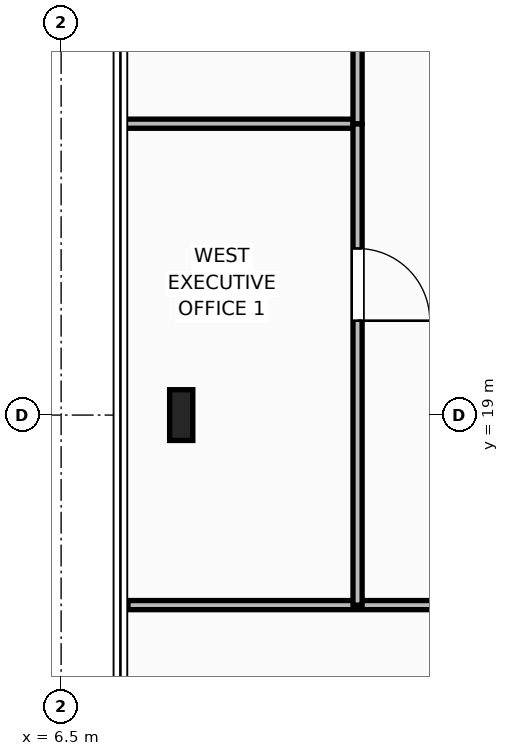
"""IFC4 building model, lengths in metres.
Left out: names, types, materials, properties, quantities, classifications, styles, units other than length and angle.
Written with IfcOpenShell. Run it as: python <this file> out.ifc"""

import sys

from ifc_helpers import new_model, si_unit, direction, frame, frame_2d, origin, origin_2d, place, context, subcontext, project, spatial, rectangle, i_section, extrude, element, fill, save


model = new_model("IFC4")
c1 = context("Model", 3, precision=1e-05, world=origin(), true_north=direction((0.0, 1.0)))
c2 = subcontext(c1, "Body", "Model", "MODEL_VIEW")
j1 = project(units=[si_unit("LENGTHUNIT", "METRE"), si_unit("PLANEANGLEUNIT", "RADIAN")], contexts=[c1])
p1 = place(None, origin())
s1 = spatial("IfcSite", under=j1, at=p1, CompositionType="ELEMENT")
p2 = place(p1, origin())
s2 = spatial("IfcBuilding", under=s1, at=p2, CompositionType="ELEMENT")
p3 = place(p2, frame((0.0, 0.0, 259.4)))
s3 = spatial("IfcBuildingStorey", under=s2, at=p3, CompositionType="ELEMENT", Elevation=259.4)
p4 = place(p3, frame((8.08, 19.0, 0.0), z_axis=(0.0, 0.0, 1.0), x_axis=(1.0, 0.0, 0.0)))
e1 = element("IfcColumn", 1, at=p4, inside=s3, PredefinedType="COLUMN", context=c2, shape_type="SweptSolid", body=[
    extrude(i_section(OverallWidth=0.305, OverallDepth=0.668, WebThickness=0.021, FlangeThickness=0.04, at=origin_2d()), origin(), (0.0, 0.0, 1.0), 3.8),
])
p5 = place(p3, frame((7.38, 16.5, 0.0), z_axis=(0.0, 0.0, 1.0), x_axis=(1.0, 0.0, 0.0)))
e2 = element("IfcWall", 2, at=p5, inside=s3, PredefinedType="PARTITIONING", context=c2, shape_type="SweptSolid", body=[
    extrude(rectangle(XDim=13.167, YDim=0.12, at=frame_2d((6.583, 0.0))), origin(), (0.0, 0.0, 1.0), 3.588),
])
p6 = place(p5, frame((7.619, 0.0, 0.0)))
e3 = element("IfcOpeningElement", 3, at=p6, cuts=e2, PredefinedType="OPENING", context=c2, shape_type="SweptSolid", body=[
    extrude(rectangle(XDim=0.95, YDim=2.15, at=frame_2d((0.475, 1.075))), frame((0.0, 0.07, 0.0), z_axis=(0.0, -1.0, 0.0), x_axis=(1.0, 0.0, 0.0)), (0.0, 0.0, 1.0), 0.14),
])
p7 = place(p3, frame((7.22, 22.833, 0.0), z_axis=(0.0, 0.0, 1.0), x_axis=(1.0, 0.0, 0.0)))
e4 = element("IfcWall", 4, at=p7, inside=s3, PredefinedType="PARTITIONING", context=c2, shape_type="SweptSolid", body=[
    extrude(rectangle(XDim=3.18, YDim=0.12, at=frame_2d((1.59, 0.0))), origin(), (0.0, 0.0, 1.0), 3.588),
])
p8 = place(p3, frame((10.4, 16.5, 0.0), z_axis=(0.0, 0.0, 1.0), x_axis=(0.0, 1.0, 0.0)))
e5 = element("IfcWall", 5, at=p8, inside=s3, PredefinedType="PARTITIONING", context=c2, shape_type="SweptSolid", body=[
    extrude(rectangle(XDim=6.333, YDim=0.12, at=frame_2d((3.167, 0.0))), origin(), (0.0, 0.0, 1.0), 3.588),
])
p9 = place(p8, frame((3.742, 0.0, 0.0)))
e6 = element("IfcOpeningElement", 6, at=p9, cuts=e5, PredefinedType="OPENING", context=c2, shape_type="SweptSolid", body=[
    extrude(rectangle(XDim=0.95, YDim=2.15, at=frame_2d((0.475, 1.075))), frame((0.0, 0.07, 0.0), z_axis=(0.0, -1.0, 0.0), x_axis=(1.0, 0.0, 0.0)), (0.0, 0.0, 1.0), 0.14),
])
p10 = place(p3, frame((10.4, 22.833, 0.0), z_axis=(0.0, 0.0, 1.0), x_axis=(0.0, 1.0, 0.0)))
e7 = element("IfcWall", 7, at=p10, inside=s3, PredefinedType="PARTITIONING", context=c2, shape_type="SweptSolid", body=[
    extrude(rectangle(XDim=6.333, YDim=0.12, at=frame_2d((3.167, 0.0))), origin(), (0.0, 0.0, 1.0), 3.588),
])
p11 = place(p10, frame((2.692, 0.0, 0.0)))
e8 = element("IfcOpeningElement", 8, at=p11, cuts=e7, PredefinedType="OPENING", context=c2, shape_type="SweptSolid", body=[
    extrude(rectangle(XDim=0.95, YDim=2.15, at=frame_2d((0.475, 1.075))), frame((0.0, 0.07, 0.0), z_axis=(0.0, -1.0, 0.0), x_axis=(1.0, 0.0, 0.0)), (0.0, 0.0, 1.0), 0.14),
])
p12 = place(p9, origin())
e9 = element("IfcDoor", 9, at=p12, inside=s3, OperationType="SINGLE_SWING_RIGHT", PredefinedType="DOOR", context=c2, shape_type="SweptSolid", body=[
    extrude(rectangle(XDim=0.95, YDim=2.15, at=frame_2d((0.475, 1.075))), frame((0.0, 0.025, 0.0), z_axis=(0.0, -1.0, 0.0), x_axis=(1.0, 0.0, 0.0)), (0.0, 0.0, 1.0), 0.05),
])
fill(e6, e9)
save(model, sys.argv[1])
